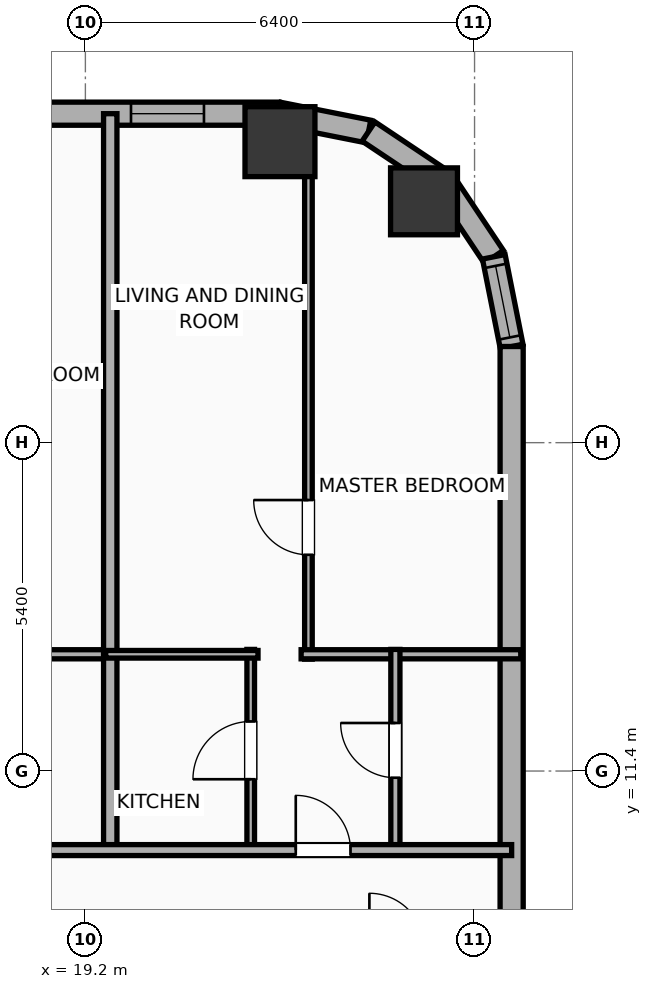
"""IFC4 building model, lengths in metres.
Left out: names, types, materials, properties, quantities, classifications, styles, units other than length and angle.
Written with IfcOpenShell. Run it as: python <this file> out.ifc"""

import sys

from ifc_helpers import new_model, si_unit, direction, frame, frame_2d, origin, origin_2d, place, context, subcontext, project, spatial, rectangle, hollow_rectangle, hollow_circle, extrude, element, fill, save


model = new_model("IFC4")
c1 = context("Model", 3, precision=1e-05, world=origin(), true_north=direction((0.0, 1.0)))
c2 = subcontext(c1, "Body", "Model", "MODEL_VIEW")
j1 = project(units=[si_unit("LENGTHUNIT", "METRE"), si_unit("PLANEANGLEUNIT", "RADIAN")], contexts=[c1])
p1 = place(None, origin())
s1 = spatial("IfcSite", under=j1, at=p1, CompositionType="ELEMENT")
p2 = place(p1, origin())
s2 = spatial("IfcBuilding", under=s1, at=p2, CompositionType="ELEMENT")
p3 = place(p2, frame((0.0, 0.0, 41.6)))
s3 = spatial("IfcBuildingStorey", under=s2, at=p3, CompositionType="ELEMENT", Elevation=41.6)
p4 = place(p3, frame((24.769, 20.769, 0.0), z_axis=(0.0, 0.0, 1.0), x_axis=(1.0, 0.0, 0.0)))
e1 = element("IfcColumn", 1, at=p4, inside=s3, PredefinedType="COLUMN", context=c2, shape_type="SweptSolid", body=[
    extrude(hollow_circle(Radius=0.55, WallThickness=0.036, at=origin_2d()), origin(), (0.0, 0.0, 1.0), 3.9),
])
p5 = place(p3, frame((22.4, 21.75, 0.0), z_axis=(0.0, 0.0, 1.0), x_axis=(1.0, 0.0, 0.0)))
e2 = element("IfcColumn", 2, at=p5, inside=s3, PredefinedType="COLUMN", context=c2, shape_type="SweptSolid", body=[
    extrude(hollow_rectangle(XDim=1.15, YDim=1.15, WallThickness=0.04, at=origin_2d()), origin(), (0.0, 0.0, 1.0), 3.9),
])
p6 = place(p3, frame((-29.581, 22.21, 0.0), z_axis=(0.0, 0.0, 1.0), x_axis=(1.0, 0.0, 0.0)))
e3 = element("IfcWall", 3, at=p6, inside=s3, PredefinedType="ELEMENTEDWALL", context=c2, shape_type="SweptSolid", body=[
    extrude(rectangle(XDim=51.963, YDim=0.38, at=frame_2d((25.981, 0.0))), origin(), (0.0, 0.0, 1.0), 3.65),
])
p7 = place(p6, frame((25.631, 0.0, 0.75)))
e4 = element("IfcOpeningElement", 4, at=p7, cuts=e3, PredefinedType="OPENING", context=c2, shape_type="SweptSolid", body=[
    extrude(rectangle(XDim=2.4, YDim=2.1, at=frame_2d((1.2, 1.05))), frame((0.0, 0.2, 0.0), z_axis=(0.0, -1.0, 0.0), x_axis=(1.0, 0.0, 0.0)), (0.0, 0.0, 1.0), 0.4),
])
p8 = place(p6, frame((42.952, 0.0, 0.75)))
e5 = element("IfcOpeningElement", 5, at=p8, cuts=e3, PredefinedType="OPENING", context=c2, shape_type="SweptSolid", body=[
    extrude(rectangle(XDim=2.4, YDim=2.1, at=frame_2d((1.2, 1.05))), frame((0.0, 0.2, 0.0), z_axis=(0.0, -1.0, 0.0), x_axis=(1.0, 0.0, 0.0)), (0.0, 0.0, 1.0), 0.4),
])
p9 = place(p6, frame((1.731, 0.0, 0.75)))
e6 = element("IfcOpeningElement", 6, at=p9, cuts=e3, PredefinedType="OPENING", context=c2, shape_type="SweptSolid", body=[
    extrude(rectangle(XDim=1.2, YDim=2.05, at=frame_2d((0.6, 1.025))), frame((0.0, 0.2, 0.0), z_axis=(0.0, -1.0, 0.0), x_axis=(1.0, 0.0, 0.0)), (0.0, 0.0, 1.0), 0.4),
])
p10 = place(p6, frame((5.272, 0.0, 0.75)))
e7 = element("IfcOpeningElement", 7, at=p10, cuts=e3, PredefinedType="OPENING", context=c2, shape_type="SweptSolid", body=[
    extrude(rectangle(XDim=1.2, YDim=2.05, at=frame_2d((0.6, 1.025))), frame((0.0, 0.2, 0.0), z_axis=(0.0, -1.0, 0.0), x_axis=(1.0, 0.0, 0.0)), (0.0, 0.0, 1.0), 0.4),
])
p11 = place(p6, frame((8.356, 0.0, 0.75)))
e8 = element("IfcOpeningElement", 8, at=p11, cuts=e3, PredefinedType="OPENING", context=c2, shape_type="SweptSolid", body=[
    extrude(rectangle(XDim=1.2, YDim=2.05, at=frame_2d((0.6, 1.025))), frame((0.0, 0.2, 0.0), z_axis=(0.0, -1.0, 0.0), x_axis=(1.0, 0.0, 0.0)), (0.0, 0.0, 1.0), 0.4),
])
p12 = place(p6, frame((15.632, 0.0, 0.75)))
e9 = element("IfcOpeningElement", 9, at=p12, cuts=e3, PredefinedType="OPENING", context=c2, shape_type="SweptSolid", body=[
    extrude(rectangle(XDim=1.2, YDim=2.05, at=frame_2d((0.6, 1.025))), frame((0.0, 0.2, 0.0), z_axis=(0.0, -1.0, 0.0), x_axis=(1.0, 0.0, 0.0)), (0.0, 0.0, 1.0), 0.4),
])
p13 = place(p6, frame((12.137, 0.0, 0.75)))
e10 = element("IfcOpeningElement", 10, at=p13, cuts=e3, PredefinedType="OPENING", context=c2, shape_type="SweptSolid", body=[
    extrude(rectangle(XDim=1.2, YDim=2.05, at=frame_2d((0.6, 1.025))), frame((0.0, 0.2, 0.0), z_axis=(0.0, -1.0, 0.0), x_axis=(1.0, 0.0, 0.0)), (0.0, 0.0, 1.0), 0.4),
])
p14 = place(p6, frame((18.756, 0.0, 0.75)))
e11 = element("IfcOpeningElement", 11, at=p14, cuts=e3, PredefinedType="OPENING", context=c2, shape_type="SweptSolid", body=[
    extrude(rectangle(XDim=1.2, YDim=2.05, at=frame_2d((0.6, 1.025))), frame((0.0, 0.2, 0.0), z_axis=(0.0, -1.0, 0.0), x_axis=(1.0, 0.0, 0.0)), (0.0, 0.0, 1.0), 0.4),
])
p15 = place(p6, frame((22.907, 0.0, 0.75)))
e12 = element("IfcOpeningElement", 12, at=p15, cuts=e3, PredefinedType="OPENING", context=c2, shape_type="SweptSolid", body=[
    extrude(rectangle(XDim=1.2, YDim=2.05, at=frame_2d((0.6, 1.025))), frame((0.0, 0.2, 0.0), z_axis=(0.0, -1.0, 0.0), x_axis=(1.0, 0.0, 0.0)), (0.0, 0.0, 1.0), 0.4),
])
p16 = place(p6, frame((36.381, 0.0, 0.75)))
e13 = element("IfcOpeningElement", 13, at=p16, cuts=e3, PredefinedType="OPENING", context=c2, shape_type="SweptSolid", body=[
    extrude(rectangle(XDim=1.2, YDim=2.05, at=frame_2d((0.6, 1.025))), frame((0.0, 0.2, 0.0), z_axis=(0.0, -1.0, 0.0), x_axis=(1.0, 0.0, 0.0)), (0.0, 0.0, 1.0), 0.4),
])
p17 = place(p6, frame((32.886, 0.0, 0.75)))
e14 = element("IfcOpeningElement", 14, at=p17, cuts=e3, PredefinedType="OPENING", context=c2, shape_type="SweptSolid", body=[
    extrude(rectangle(XDim=1.2, YDim=2.05, at=frame_2d((0.6, 1.025))), frame((0.0, 0.2, 0.0), z_axis=(0.0, -1.0, 0.0), x_axis=(1.0, 0.0, 0.0)), (0.0, 0.0, 1.0), 0.4),
])
p18 = place(p6, frame((39.556, 0.0, 0.75)))
e15 = element("IfcOpeningElement", 15, at=p18, cuts=e3, PredefinedType="OPENING", context=c2, shape_type="SweptSolid", body=[
    extrude(rectangle(XDim=1.2, YDim=2.05, at=frame_2d((0.6, 1.025))), frame((0.0, 0.2, 0.0), z_axis=(0.0, -1.0, 0.0), x_axis=(1.0, 0.0, 0.0)), (0.0, 0.0, 1.0), 0.4),
])
p19 = place(p6, frame((46.885, 0.0, 0.75)))
e16 = element("IfcOpeningElement", 16, at=p19, cuts=e3, PredefinedType="OPENING", context=c2, shape_type="SweptSolid", body=[
    extrude(rectangle(XDim=1.2, YDim=2.05, at=frame_2d((0.6, 1.025))), frame((0.0, 0.2, 0.0), z_axis=(0.0, -1.0, 0.0), x_axis=(1.0, 0.0, 0.0)), (0.0, 0.0, 1.0), 0.4),
])
p20 = place(p6, frame((49.531, 0.0, 0.75)))
e17 = element("IfcOpeningElement", 17, at=p20, cuts=e3, PredefinedType="OPENING", context=c2, shape_type="SweptSolid", body=[
    extrude(rectangle(XDim=1.2, YDim=2.05, at=frame_2d((0.6, 1.025))), frame((0.0, 0.2, 0.0), z_axis=(0.0, -1.0, 0.0), x_axis=(1.0, 0.0, 0.0)), (0.0, 0.0, 1.0), 0.4),
])
p21 = place(p3, frame((22.381, 22.21, 0.0), z_axis=(0.0, 0.0, 1.0), x_axis=(0.980786132421, -0.195086038585, 0.0)))
e18 = element("IfcWall", 18, at=p21, inside=s3, PredefinedType="ELEMENTEDWALL", context=c2, shape_type="SweptSolid", body=[
    extrude(rectangle(XDim=1.504, YDim=0.38, at=frame_2d((0.752, 0.0))), origin(), (0.0, 0.0, 1.0), 3.65),
])
for number, where, z_axis, x_axis in (
    (19, (23.857, 21.917, 0.0), (0.0, 0.0, 1.0), (0.831, -0.556, 0.0)),
    (20, (25.091, 21.091, 0.0), (0.0, 0.0, 1.0), (0.556, -0.831, 0.0)),
):
    element("IfcWall", number, at=place(p3, frame(where, z_axis=z_axis, x_axis=x_axis)), inside=s3, PredefinedType="ELEMENTEDWALL", context=c2, shape_type="SweptSolid", body=[
        extrude(rectangle(XDim=1.485, YDim=0.38, at=frame_2d((0.743, 0.0))), origin(), (0.0, 0.0, 1.0), 3.65),
    ])
p22 = place(p3, frame((25.917, 19.857, 0.0), z_axis=(0.0, 0.0, 1.0), x_axis=(0.195086038585, -0.980786132421, 0.0)))
e21 = element("IfcWall", 21, at=p22, inside=s3, PredefinedType="ELEMENTEDWALL", context=c2, shape_type="SweptSolid", body=[
    extrude(rectangle(XDim=1.504, YDim=0.38, at=frame_2d((0.752, 0.0))), origin(), (0.0, 0.0, 1.0), 3.65),
])
p23 = place(p22, frame((0.152, 0.0, 0.75)))
e22 = element("IfcOpeningElement", 22, at=p23, cuts=e21, PredefinedType="OPENING", context=c2, shape_type="SweptSolid", body=[
    extrude(rectangle(XDim=1.2, YDim=2.05, at=frame_2d((0.6, 1.025))), frame((0.0, 0.2, 0.0), z_axis=(0.0, -1.0, 0.0), x_axis=(1.0, 0.0, 0.0)), (0.0, 0.0, 1.0), 0.4),
])
p24 = place(p3, frame((26.21, 18.381, 0.0), z_axis=(0.0, 0.0, 1.0), x_axis=(0.0, -1.0, 0.0)))
e23 = element("IfcWall", 23, at=p24, inside=s3, PredefinedType="ELEMENTEDWALL", context=c2, shape_type="SweptSolid", body=[
    extrude(rectangle(XDim=36.763, YDim=0.38, at=frame_2d((18.381, 0.0))), origin(), (0.0, 0.0, 1.0), 3.65),
])
p25 = place(p3, frame((16.079, 13.32, 0.0), z_axis=(0.0, 0.0, 1.0), x_axis=(1.0, 0.0, 0.0)))
e24 = element("IfcWall", 24, at=p25, inside=s3, PredefinedType="PLUMBINGWALL", context=c2, shape_type="SweptSolid", body=[
    extrude(rectangle(XDim=3.605, YDim=0.15, at=frame_2d((1.802, 0.0))), origin(), (0.0, 0.0, 1.0), 3.65),
])
p26 = place(p3, frame((19.609, 10.02, 0.0), z_axis=(0.0, 0.0, 1.0), x_axis=(0.0, 1.0, 0.0)))
e25 = element("IfcWall", 25, at=p26, inside=s3, PredefinedType="PARTITIONING", context=c2, shape_type="SweptSolid", body=[
    extrude(rectangle(XDim=12.19, YDim=0.22, at=frame_2d((6.095, 0.0))), origin(), (0.0, 0.0, 1.0), 3.65),
])
p27 = place(p3, frame((22.868, 13.24, 0.0), z_axis=(0.0, 0.0, 1.0), x_axis=(0.0, 1.0, 0.0)))
e26 = element("IfcWall", 26, at=p27, inside=s3, PredefinedType="PARTITIONING", context=c2, shape_type="SweptSolid", body=[
    extrude(rectangle(XDim=9.026, YDim=0.125, at=frame_2d((4.513, 0.0))), origin(), (0.0, 0.0, 1.0), 2.94),
])
p28 = place(p27, frame((1.716, 0.0, 0.0)))
e27 = element("IfcOpeningElement", 27, at=p28, cuts=e26, PredefinedType="OPENING", context=c2, shape_type="SweptSolid", body=[
    extrude(rectangle(XDim=0.9, YDim=2.05, at=frame_2d((0.45, 1.025))), frame((0.0, 0.073, 0.0), z_axis=(0.0, -1.0, 0.0), x_axis=(1.0, 0.0, 0.0)), (0.0, 0.0, 1.0), 0.145),
])
p29 = place(p3, frame((22.748, 13.32, 0.0), z_axis=(0.0, 0.0, 1.0), x_axis=(1.0, 0.0, 0.0)))
e28 = element("IfcWall", 28, at=p29, inside=s3, PredefinedType="PLUMBINGWALL", context=c2, shape_type="SweptSolid", body=[
    extrude(rectangle(XDim=3.612, YDim=0.15, at=frame_2d((1.806, 0.0))), origin(), (0.0, 0.0, 1.0), 3.65),
])
p30 = place(p3, frame((21.919, 10.08, 0.0), z_axis=(0.0, 0.0, 1.0), x_axis=(0.0, 1.0, 0.0)))
e29 = element("IfcWall", 29, at=p30, inside=s3, PredefinedType="PARTITIONING", context=c2, shape_type="SweptSolid", body=[
    extrude(rectangle(XDim=3.32, YDim=0.125, at=frame_2d((1.66, 0.0))), origin(), (0.0, 0.0, 1.0), 3.65),
])
p31 = place(p30, frame((1.185, 0.0, 0.0)))
e30 = element("IfcOpeningElement", 30, at=p31, cuts=e29, PredefinedType="OPENING", context=c2, shape_type="SweptSolid", body=[
    extrude(rectangle(XDim=0.95, YDim=2.05, at=frame_2d((0.475, 1.025))), frame((0.0, 0.073, 0.0), z_axis=(0.0, -1.0, 0.0), x_axis=(1.0, 0.0, 0.0)), (0.0, 0.0, 1.0), 0.145),
])
p32 = place(p3, frame((19.534, 13.32, 0.0), z_axis=(0.0, 0.0, 1.0), x_axis=(1.0, 0.0, 0.0)))
e31 = element("IfcWall", 31, at=p32, inside=s3, PredefinedType="PARTITIONING", context=c2, shape_type="SweptSolid", body=[
    extrude(rectangle(XDim=2.505, YDim=0.125, at=frame_2d((1.252, 0.0))), origin(), (0.0, 0.0, 1.0), 3.65),
])
p33 = place(p3, frame((24.298, 10.08, 0.0), z_axis=(0.0, 0.0, 1.0), x_axis=(0.0, 1.0, 0.0)))
e32 = element("IfcWall", 32, at=p33, inside=s3, PredefinedType="PLUMBINGWALL", context=c2, shape_type="SweptSolid", body=[
    extrude(rectangle(XDim=3.32, YDim=0.15, at=frame_2d((1.66, 0.0))), origin(), (0.0, 0.0, 1.0), 3.65),
])
p34 = place(p33, frame((1.21, 0.0, 0.0)))
e33 = element("IfcOpeningElement", 33, at=p34, cuts=e32, PredefinedType="OPENING", context=c2, shape_type="SweptSolid", body=[
    extrude(rectangle(XDim=0.9, YDim=2.05, at=frame_2d((0.45, 1.025))), frame((0.0, 0.085, 0.0), z_axis=(0.0, -1.0, 0.0), x_axis=(1.0, 0.0, 0.0)), (0.0, 0.0, 1.0), 0.17),
])
p35 = place(p3, frame((-33.41, 10.1, 0.0), z_axis=(0.0, 0.0, 1.0), x_axis=(1.0, 0.0, 0.0)))
e34 = element("IfcWall", 34, at=p35, inside=s3, PredefinedType="PARTITIONING", context=c2, shape_type="SweptSolid", body=[
    extrude(rectangle(XDim=59.62, YDim=0.18, at=frame_2d((29.81, 0.0))), origin(), (0.0, 0.0, 1.0), 3.65),
])
p36 = place(p35, frame((3.354, 0.0, 0.0)))
e35 = element("IfcOpeningElement", 35, at=p36, cuts=e34, PredefinedType="OPENING", context=c2, shape_type="SweptSolid", body=[
    extrude(rectangle(XDim=1.15, YDim=2.05, at=frame_2d((0.575, 1.025))), frame((0.0, 0.1, 0.0), z_axis=(0.0, -1.0, 0.0), x_axis=(1.0, 0.0, 0.0)), (0.0, 0.0, 1.0), 0.2),
])
p37 = place(p35, frame((10.997, 0.0, 0.0)))
e36 = element("IfcOpeningElement", 36, at=p37, cuts=e34, PredefinedType="OPENING", context=c2, shape_type="SweptSolid", body=[
    extrude(rectangle(XDim=1.15, YDim=2.05, at=frame_2d((0.575, 1.025))), frame((0.0, 0.1, 0.0), z_axis=(0.0, -1.0, 0.0), x_axis=(1.0, 0.0, 0.0)), (0.0, 0.0, 1.0), 0.2),
])
p38 = place(p35, frame((20.232, 0.0, 0.0)))
e37 = element("IfcOpeningElement", 37, at=p38, cuts=e34, PredefinedType="OPENING", context=c2, shape_type="SweptSolid", body=[
    extrude(rectangle(XDim=1.15, YDim=2.05, at=frame_2d((0.575, 1.025))), frame((0.0, 0.1, 0.0), z_axis=(0.0, -1.0, 0.0), x_axis=(1.0, 0.0, 0.0)), (0.0, 0.0, 1.0), 0.2),
])
p39 = place(p35, frame((30.38, 0.0, 0.0)))
e38 = element("IfcOpeningElement", 38, at=p39, cuts=e34, PredefinedType="OPENING", context=c2, shape_type="SweptSolid", body=[
    extrude(rectangle(XDim=1.15, YDim=2.05, at=frame_2d((0.575, 1.025))), frame((0.0, 0.1, 0.0), z_axis=(0.0, -1.0, 0.0), x_axis=(1.0, 0.0, 0.0)), (0.0, 0.0, 1.0), 0.2),
])
p40 = place(p35, frame((40.998, 0.0, 0.0)))
e39 = element("IfcOpeningElement", 39, at=p40, cuts=e34, PredefinedType="OPENING", context=c2, shape_type="SweptSolid", body=[
    extrude(rectangle(XDim=1.15, YDim=2.05, at=frame_2d((0.575, 1.025))), frame((0.0, 0.1, 0.0), z_axis=(0.0, -1.0, 0.0), x_axis=(1.0, 0.0, 0.0)), (0.0, 0.0, 1.0), 0.2),
])
p41 = place(p35, frame((49.428, 0.0, 0.0)))
e40 = element("IfcOpeningElement", 40, at=p41, cuts=e34, PredefinedType="OPENING", context=c2, shape_type="SweptSolid", body=[
    extrude(rectangle(XDim=0.9, YDim=2.05, at=frame_2d((0.45, 1.025))), frame((0.0, 0.1, 0.0), z_axis=(0.0, -1.0, 0.0), x_axis=(1.0, 0.0, 0.0)), (0.0, 0.0, 1.0), 0.2),
])
p42 = place(p35, frame((56.07, 0.0, 0.0)))
e41 = element("IfcOpeningElement", 41, at=p42, cuts=e34, PredefinedType="OPENING", context=c2, shape_type="SweptSolid", body=[
    extrude(rectangle(XDim=0.9, YDim=2.05, at=frame_2d((0.45, 1.025))), frame((0.0, 0.1, 0.0), z_axis=(0.0, -1.0, 0.0), x_axis=(1.0, 0.0, 0.0)), (0.0, 0.0, 1.0), 0.2),
])
p43 = place(p20, origin())
e42 = element("IfcWindow", 42, at=p43, inside=s3, PartitioningType="SINGLE_PANEL", PredefinedType="WINDOW", context=c2, shape_type="SweptSolid", body=[
    extrude(rectangle(XDim=1.2, YDim=2.05, at=frame_2d((0.6, 1.025))), frame((0.0, 0.03, 0.0), z_axis=(0.0, -1.0, 0.0), x_axis=(1.0, 0.0, 0.0)), (0.0, 0.0, 1.0), 0.06),
])
fill(e17, e42)
p44 = place(p23, origin())
e43 = element("IfcWindow", 43, at=p44, inside=s3, PartitioningType="SINGLE_PANEL", PredefinedType="WINDOW", context=c2, shape_type="SweptSolid", body=[
    extrude(rectangle(XDim=1.2, YDim=2.05, at=frame_2d((0.6, 1.025))), frame((0.0, 0.03, 0.0), z_axis=(0.0, -1.0, 0.0), x_axis=(1.0, 0.0, 0.0)), (0.0, 0.0, 1.0), 0.06),
])
fill(e22, e43)
p45 = place(p28, origin())
e44 = element("IfcDoor", 44, at=p45, inside=s3, OperationType="SINGLE_SWING_RIGHT", PredefinedType="DOOR", context=c2, shape_type="SweptSolid", body=[
    extrude(rectangle(XDim=0.9, YDim=2.05, at=frame_2d((0.45, 1.025))), frame((0.0, 0.025, 0.0), z_axis=(0.0, -1.0, 0.0), x_axis=(1.0, 0.0, 0.0)), (0.0, 0.0, 1.0), 0.05),
])
fill(e27, e44)
p46 = place(p31, origin())
e45 = element("IfcDoor", 45, at=p46, inside=s3, OperationType="SINGLE_SWING_LEFT", PredefinedType="DOOR", context=c2, shape_type="SweptSolid", body=[
    extrude(rectangle(XDim=0.95, YDim=2.05, at=frame_2d((0.475, 1.025))), frame((0.0, 0.025, 0.0), z_axis=(0.0, -1.0, 0.0), x_axis=(1.0, 0.0, 0.0)), (0.0, 0.0, 1.0), 0.05),
])
fill(e30, e45)
p47 = place(p34, origin())
e46 = element("IfcDoor", 46, at=p47, inside=s3, OperationType="SINGLE_SWING_RIGHT", PredefinedType="DOOR", context=c2, shape_type="SweptSolid", body=[
    extrude(rectangle(XDim=0.9, YDim=2.05, at=frame_2d((0.45, 1.025))), frame((0.0, 0.025, 0.0), z_axis=(0.0, -1.0, 0.0), x_axis=(1.0, 0.0, 0.0)), (0.0, 0.0, 1.0), 0.05),
])
fill(e33, e46)
p48 = place(p42, origin())
e47 = element("IfcDoor", 47, at=p48, inside=s3, OperationType="SINGLE_SWING_LEFT", PredefinedType="DOOR", context=c2, shape_type="SweptSolid", body=[
    extrude(rectangle(XDim=0.9, YDim=2.05, at=frame_2d((0.45, 1.025))), frame((0.0, 0.025, 0.0), z_axis=(0.0, -1.0, 0.0), x_axis=(1.0, 0.0, 0.0)), (0.0, 0.0, 1.0), 0.05),
])
fill(e41, e47)
save(model, sys.argv[1])
